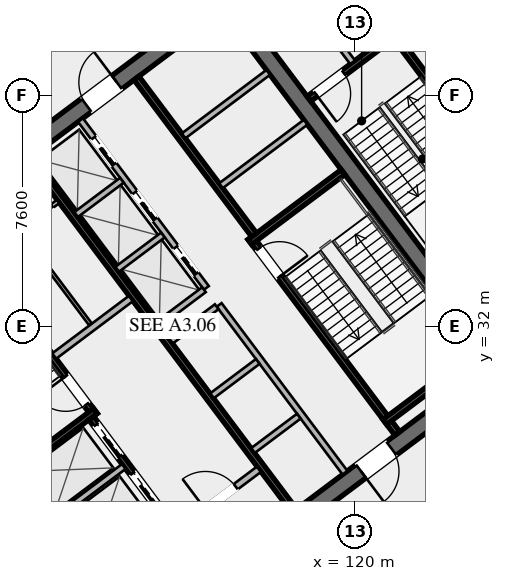
"""IFC4 building model, lengths in metres.
Left out: names, types, materials, properties, quantities, classifications, styles, units other than length and angle.
Written with IfcOpenShell. Run it as: python <this file> out.ifc"""

import sys

from ifc_helpers import new_model, si_unit, direction, frame, frame_2d, origin, place, context, subcontext, project, spatial, rectangle, extrude, element, fill, save


model = new_model("IFC4")
c1 = context("Model", 3, precision=1e-05, world=origin(), true_north=direction((0.0, 1.0)))
c2 = subcontext(c1, "Body", "Model", "MODEL_VIEW")
j1 = project(units=[si_unit("LENGTHUNIT", "METRE"), si_unit("PLANEANGLEUNIT", "RADIAN")], contexts=[c1])
p1 = place(None, origin())
s1 = spatial("IfcSite", under=j1, at=p1, CompositionType="ELEMENT")
p2 = place(p1, origin())
s2 = spatial("IfcBuilding", under=s1, at=p2, CompositionType="ELEMENT")
p3 = place(p2, frame((0.0, 0.0, 109.8)))
s3 = spatial("IfcBuildingStorey", under=s2, at=p3, CompositionType="ELEMENT", Elevation=109.8)
for number, where, z_axis, x_axis in (
    (1, (112.436, 21.077, 0.0), (0.0, 0.0, 1.0), (-0.6, 0.8, 0.0)),
    (2, (115.564, 42.923, 0.0), (0.0, 0.0, 1.0), (0.6, -0.8, 0.0)),
):
    element("IfcWall", number, at=place(p3, frame(where, z_axis=z_axis, x_axis=x_axis)), inside=s3, PredefinedType="SHEAR", context=c2, shape_type="SweptSolid", body=[
        extrude(rectangle(XDim=15.6, YDim=0.55, at=frame_2d((7.8, 0.0))), origin(), (0.0, 0.0, 1.0), 4.6),
    ])
p4 = place(p3, frame((124.539, 30.498, 0.0), z_axis=(0.0, 0.0, 1.0), x_axis=(-0.799998054672, -0.600002593761, 0.0)))
e3 = element("IfcWall", 3, at=p4, inside=s3, PredefinedType="SHEAR", context=c2, shape_type="SweptSolid", body=[
    extrude(rectangle(XDim=15.06, YDim=0.55, at=frame_2d((7.53, 0.0))), origin(), (0.0, 0.0, 1.0), 4.6),
])
p5 = place(p4, frame((9.23, 0.0, 0.0)))
e4 = element("IfcOpeningElement", 4, at=p5, cuts=e3, PredefinedType="OPENING", context=c2, shape_type="SweptSolid", body=[
    extrude(rectangle(XDim=1.25, YDim=2.25, at=frame_2d((0.625, 1.125))), frame((0.0, 0.285, 0.0), z_axis=(0.0, -1.0, 0.0), x_axis=(1.0, 0.0, 0.0)), (0.0, 0.0, 1.0), 0.57),
])
p6 = place(p4, frame((4.18, 0.0, 0.0)))
e5 = element("IfcOpeningElement", 5, at=p6, cuts=e3, PredefinedType="OPENING", context=c2, shape_type="SweptSolid", body=[
    extrude(rectangle(XDim=1.25, YDim=2.25, at=frame_2d((0.625, 1.125))), frame((0.0, 0.285, 0.0), z_axis=(0.0, -1.0, 0.0), x_axis=(1.0, 0.0, 0.0)), (0.0, 0.0, 1.0), 0.57),
])
p7 = place(p3, frame((103.461, 33.502, 0.0), z_axis=(0.0, 0.0, 1.0), x_axis=(0.799998054672, 0.600002593761, 0.0)))
e6 = element("IfcWall", 6, at=p7, inside=s3, PredefinedType="SHEAR", context=c2, shape_type="SweptSolid", body=[
    extrude(rectangle(XDim=15.06, YDim=0.55, at=frame_2d((7.53, 0.0))), origin(), (0.0, 0.0, 1.0), 4.6),
])
p8 = place(p7, frame((4.58, 0.0, 0.0)))
e7 = element("IfcOpeningElement", 7, at=p8, cuts=e6, PredefinedType="OPENING", context=c2, shape_type="SweptSolid", body=[
    extrude(rectangle(XDim=1.25, YDim=2.25, at=frame_2d((0.625, 1.125))), frame((0.0, 0.285, 0.0), z_axis=(0.0, -1.0, 0.0), x_axis=(1.0, 0.0, 0.0)), (0.0, 0.0, 1.0), 0.57),
])
p9 = place(p7, frame((9.63, 0.0, 0.0)))
e8 = element("IfcOpeningElement", 8, at=p9, cuts=e6, PredefinedType="OPENING", context=c2, shape_type="SweptSolid", body=[
    extrude(rectangle(XDim=1.25, YDim=2.25, at=frame_2d((0.625, 1.125))), frame((0.0, 0.285, 0.0), z_axis=(0.0, -1.0, 0.0), x_axis=(1.0, 0.0, 0.0)), (0.0, 0.0, 1.0), 0.57),
])
for number, where, z_axis, x_axis in (
    (9, (137.672, 26.904, 0.0), (0.0, 0.0, 1.0), (-0.8, -0.6, 0.0)),
    (10, (90.328, 37.096, 0.0), (0.0, 0.0, 1.0), (0.8, 0.6, 0.0)),
    (11, (119.096, 55.672, 0.0), (0.0, 0.0, 1.0), (0.6, -0.8, 0.0)),
):
    element("IfcWall", number, at=place(p3, frame(where, z_axis=z_axis, x_axis=x_axis)), inside=s3, PredefinedType="SOLIDWALL", context=c2, shape_type="SweptSolid", body=[
        extrude(rectangle(XDim=31.76, YDim=0.28, at=frame_2d((15.88, 0.0))), origin(), (0.0, 0.0, 1.0), 4.42),
    ])
p10 = place(p3, frame((111.44, 29.08, 0.0), z_axis=(0.0, 0.0, 1.0), x_axis=(-0.59999029481, 0.8000072788, 0.0)))
e12 = element("IfcWall", 12, at=p10, inside=s3, PredefinedType="SHEAR", context=c2, shape_type="SweptSolid", body=[
    extrude(rectangle(XDim=8.05, YDim=0.2, at=frame_2d((4.025, 0.0))), origin(), (0.0, 0.0, 1.0), 4.42),
])
p11 = place(p10, frame((0.45, 0.0, 0.0)))
e13 = element("IfcOpeningElement", 13, at=p11, cuts=e12, PredefinedType="OPENING", context=c2, shape_type="SweptSolid", body=[
    extrude(rectangle(XDim=1.15, YDim=2.2, at=frame_2d((0.575, 1.1))), frame((0.0, 0.11, 0.0), z_axis=(0.0, -1.0, 0.0), x_axis=(1.0, 0.0, 0.0)), (0.0, 0.0, 1.0), 0.22),
])
p12 = place(p3, frame((108.396, 26.922, 0.0), z_axis=(0.0, 0.0, 1.0), x_axis=(0.800015298837, 0.599979601008, 0.0)))
e14 = element("IfcWall", 14, at=p12, inside=s3, PredefinedType="SHEAR", context=c2, shape_type="SweptSolid", body=[
    extrude(rectangle(XDim=3.83, YDim=0.2, at=frame_2d((1.915, 0.0))), origin(), (0.0, 0.0, 1.0), 4.42),
])
p13 = place(p3, frame((116.56, 34.92, 0.0), z_axis=(0.0, 0.0, 1.0), x_axis=(0.59999029481, -0.8000072788, 0.0)))
e15 = element("IfcWall", 15, at=p13, inside=s3, PredefinedType="SHEAR", context=c2, shape_type="SweptSolid", body=[
    extrude(rectangle(XDim=8.05, YDim=0.2, at=frame_2d((4.025, 0.0))), origin(), (0.0, 0.0, 1.0), 4.42),
])
p14 = place(p13, frame((0.45, 0.0, 0.0)))
e16 = element("IfcOpeningElement", 16, at=p14, cuts=e15, PredefinedType="OPENING", context=c2, shape_type="SweptSolid", body=[
    extrude(rectangle(XDim=1.15, YDim=2.2, at=frame_2d((0.575, 1.1))), frame((0.0, 0.11, 0.0), z_axis=(0.0, -1.0, 0.0), x_axis=(1.0, 0.0, 0.0)), (0.0, 0.0, 1.0), 0.22),
])
for number, where, z_axis, x_axis in (
    (17, (116.54, 34.78, 0.0), (0.0, 0.0, 1.0), (0.8, 0.6, 0.0)),
    (18, (120.98, 28.86, 0.0), (0.0, 0.0, 1.0), (0.8, 0.6, 0.0)),
):
    element("IfcWall", number, at=place(p3, frame(where, z_axis=z_axis, x_axis=x_axis)), inside=s3, PredefinedType="SHEAR", context=c2, shape_type="SweptSolid", body=[
        extrude(rectangle(XDim=3.83, YDim=0.2, at=frame_2d((1.915, 0.0))), origin(), (0.0, 0.0, 1.0), 4.42),
    ])
p15 = place(p3, frame((117.998, 25.936, 0.0), z_axis=(0.0, 0.0, 1.0), x_axis=(-0.600002693989, 0.799997979501, 0.0)))
e19 = element("IfcWall", 19, at=p15, inside=s3, PredefinedType="SHEAR", context=c2, shape_type="SweptSolid", body=[
    extrude(rectangle(XDim=14.5, YDim=0.2, at=frame_2d((7.25, 0.0))), origin(), (0.0, 0.0, 1.0), 4.42),
])
p16 = place(p3, frame((110.104, 31.028, 0.0), z_axis=(0.0, 0.0, 1.0), x_axis=(0.800018601094, 0.59997519774, 0.0)))
e20 = element("IfcWall", 20, at=p16, inside=s3, PredefinedType="SOLIDWALL", context=c2, shape_type="SweptSolid", body=[
    extrude(rectangle(XDim=3.15, YDim=0.22, at=frame_2d((1.575, 0.0))), origin(), (0.0, 0.0, 1.0), 3.531),
])
p17 = place(p3, frame((114.316, 25.412, 0.0), z_axis=(0.0, 0.0, 1.0), x_axis=(0.800018601094, 0.59997519774, 0.0)))
e21 = element("IfcWall", 21, at=p17, inside=s3, PredefinedType="SOLIDWALL", context=c2, shape_type="SweptSolid", body=[
    extrude(rectangle(XDim=3.15, YDim=0.22, at=frame_2d((1.575, 0.0))), origin(), (0.0, 0.0, 1.0), 3.531),
])
p18 = place(p17, frame((0.95, 0.0, 0.0)))
e22 = element("IfcOpeningElement", 22, at=p18, cuts=e21, PredefinedType="OPENING", context=c2, shape_type="SweptSolid", body=[
    extrude(rectangle(XDim=1.25, YDim=2.25, at=frame_2d((0.625, 1.125))), frame((0.0, 0.12, 0.0), z_axis=(0.0, -1.0, 0.0), x_axis=(1.0, 0.0, 0.0)), (0.0, 0.0, 1.0), 0.24),
])
p19 = place(p3, frame((115.19, 23.83, 0.0), z_axis=(0.0, 0.0, 1.0), x_axis=(-0.599993943644, 0.800004542231, 0.0)))
e23 = element("IfcWall", 23, at=p19, inside=s3, PredefinedType="SHEAR", context=c2, shape_type="SweptSolid", body=[
    extrude(rectangle(XDim=6.45, YDim=0.2, at=frame_2d((3.225, 0.0))), origin(), (0.0, 0.0, 1.0), 4.42),
])
p20 = place(p19, frame((4.875, 0.0, 0.0)))
e24 = element("IfcOpeningElement", 24, at=p20, cuts=e23, PredefinedType="OPENING", context=c2, shape_type="SweptSolid", body=[
    extrude(rectangle(XDim=1.3, YDim=2.25, at=frame_2d((0.65, 1.125))), frame((0.0, 0.11, 0.0), z_axis=(0.0, -1.0, 0.0), x_axis=(1.0, 0.0, 0.0)), (0.0, 0.0, 1.0), 0.22),
])
p21 = place(p19, frame((2.875, 0.0, 0.0)))
e25 = element("IfcOpeningElement", 25, at=p21, cuts=e23, PredefinedType="OPENING", context=c2, shape_type="SweptSolid", body=[
    extrude(rectangle(XDim=1.3, YDim=2.25, at=frame_2d((0.65, 1.125))), frame((0.0, 0.11, 0.0), z_axis=(0.0, -1.0, 0.0), x_axis=(1.0, 0.0, 0.0)), (0.0, 0.0, 1.0), 0.22),
])
p22 = place(p19, frame((0.675, 0.0, 0.0)))
e26 = element("IfcOpeningElement", 26, at=p22, cuts=e23, PredefinedType="OPENING", context=c2, shape_type="SweptSolid", body=[
    extrude(rectangle(XDim=1.3, YDim=2.25, at=frame_2d((0.65, 1.125))), frame((0.0, 0.11, 0.0), z_axis=(0.0, -1.0, 0.0), x_axis=(1.0, 0.0, 0.0)), (0.0, 0.0, 1.0), 0.22),
])
p23 = place(p3, frame((109.608, 25.306, 0.0), z_axis=(0.0, 0.0, 1.0), x_axis=(0.8, 0.6, 0.0)))
e27 = element("IfcWall", 27, at=p23, inside=s3, PredefinedType="SOLIDWALL", context=c2, shape_type="SweptSolid", body=[
    extrude(rectangle(XDim=3.48, YDim=0.2, at=frame_2d((1.74, 0.0))), origin(), (0.0, 0.0, 1.0), 4.42),
])
p24 = place(p3, frame((112.81, 40.17, 0.0), z_axis=(0.0, 0.0, 1.0), x_axis=(0.599993943644, -0.800004542231, 0.0)))
e28 = element("IfcWall", 28, at=p24, inside=s3, PredefinedType="SHEAR", context=c2, shape_type="SweptSolid", body=[
    extrude(rectangle(XDim=6.45, YDim=0.2, at=frame_2d((3.225, 0.0))), origin(), (0.0, 0.0, 1.0), 4.42),
])
for number, where, z_axis, x_axis in (
    (29, (115.59, 36.63, 0.0), (0.0, 0.0, 1.0), (0.8, 0.6, 0.0)),
    (30, (114.36, 38.27, 0.0), (0.0, 0.0, 1.0), (0.8, 0.6, 0.0)),
):
    element("IfcWall", number, at=place(p3, frame(where, z_axis=z_axis, x_axis=x_axis)), inside=s3, PredefinedType="SOLIDWALL", context=c2, shape_type="SweptSolid", body=[
        extrude(rectangle(XDim=3.48, YDim=0.2, at=frame_2d((1.74, 0.0))), origin(), (0.0, 0.0, 1.0), 4.42),
    ])
p25 = place(p3, frame((107.71, 34.22, 0.0), z_axis=(0.0, 0.0, 1.0), x_axis=(0.799981399002, 0.60002480053, 0.0)))
e31 = element("IfcWall", 31, at=p25, inside=s3, PredefinedType="PARTITIONING", context=c2, shape_type="SweptSolid", body=[
    extrude(rectangle(XDim=3.15, YDim=0.135, at=frame_2d((1.575, 0.0))), origin(), (0.0, 0.0, 1.0), 3.531),
])
p26 = place(p25, frame((0.25, 0.0, 0.0)))
e32 = element("IfcOpeningElement", 32, at=p26, cuts=e31, PredefinedType="OPENING", context=c2, shape_type="SweptSolid", body=[
    extrude(rectangle(XDim=0.95, YDim=2.05, at=frame_2d((0.475, 1.025))), frame((0.0, 0.077, 0.0), z_axis=(0.0, -1.0, 0.0), x_axis=(1.0, 0.0, 0.0)), (0.0, 0.0, 1.0), 0.155),
])
p27 = place(p25, frame((1.95, 0.0, 0.0)))
e33 = element("IfcOpeningElement", 33, at=p27, cuts=e31, PredefinedType="OPENING", context=c2, shape_type="SweptSolid", body=[
    extrude(rectangle(XDim=0.95, YDim=2.05, at=frame_2d((0.475, 1.025))), frame((0.0, 0.077, 0.0), z_axis=(0.0, -1.0, 0.0), x_axis=(1.0, 0.0, 0.0)), (0.0, 0.0, 1.0), 0.155),
])
p28 = place(p3, frame((111.296, 32.072, 0.0), z_axis=(0.0, 0.0, 1.0), x_axis=(-0.59995887973, 0.800030838552, 0.0)))
e34 = element("IfcWall", 34, at=p28, inside=s3, PredefinedType="PARTITIONING", context=c2, shape_type="SweptSolid", body=[
    extrude(rectangle(XDim=3.8, YDim=0.11, at=frame_2d((1.9, 0.0))), origin(), (0.0, 0.0, 1.0), 3.531),
])
p29 = place(p3, frame((119.67, 27.19, 0.0), z_axis=(0.0, 0.0, 1.0), x_axis=(-0.599988677396, 0.800008491828, 0.0)))
e35 = element("IfcWall", 35, at=p29, inside=s3, PredefinedType="SOLIDWALL", context=c2, shape_type="SweptSolid", body=[
    extrude(rectangle(XDim=6.9, YDim=0.2, at=frame_2d((3.45, 0.0))), origin(), (0.0, 0.0, 1.0), 4.42),
])
p30 = place(p3, frame((116.646, 27.922, 0.0), z_axis=(0.0, 0.0, 1.0), x_axis=(0.8, 0.6, 0.0)))
e36 = element("IfcWall", 36, at=p30, inside=s3, PredefinedType="SOLIDWALL", context=c2, shape_type="SweptSolid", body=[
    extrude(rectangle(XDim=1.88, YDim=0.2, at=frame_2d((0.94, 0.0))), origin(), (0.0, 0.0, 1.0), 4.42),
])
p31 = place(p3, frame((115.296, 29.722, 0.0), z_axis=(0.0, 0.0, 1.0), x_axis=(0.799984418148, 0.600020775241, 0.0)))
e37 = element("IfcWall", 37, at=p31, inside=s3, PredefinedType="SOLIDWALL", context=c2, shape_type="SweptSolid", body=[
    extrude(rectangle(XDim=1.88, YDim=0.2, at=frame_2d((0.94, 0.0))), origin(), (0.0, 0.0, 1.0), 4.42),
])
p32 = place(p3, frame((113.946, 31.522, 0.0), z_axis=(0.0, 0.0, 1.0), x_axis=(0.8, 0.6, 0.0)))
e38 = element("IfcWall", 38, at=p32, inside=s3, PredefinedType="SOLIDWALL", context=c2, shape_type="SweptSolid", body=[
    extrude(rectangle(XDim=1.88, YDim=0.2, at=frame_2d((0.94, 0.0))), origin(), (0.0, 0.0, 1.0), 4.42),
])
p33 = place(p3, frame((115.11, 33.27, 0.0), z_axis=(0.0, 0.0, 1.0), x_axis=(-0.600011322243, 0.799991508192, 0.0)))
e39 = element("IfcWall", 39, at=p33, inside=s3, PredefinedType="SOLIDWALL", context=c2, shape_type="SweptSolid", body=[
    extrude(rectangle(XDim=6.9, YDim=0.2, at=frame_2d((3.45, 0.0))), origin(), (0.0, 0.0, 1.0), 4.42),
])
p34 = place(p33, frame((0.575, 0.0, 0.0)))
e40 = element("IfcOpeningElement", 40, at=p34, cuts=e39, PredefinedType="OPENING", context=c2, shape_type="SweptSolid", body=[
    extrude(rectangle(XDim=1.1, YDim=2.2, at=frame_2d((0.55, 1.1))), frame((0.0, 0.11, 0.0), z_axis=(0.0, -1.0, 0.0), x_axis=(1.0, 0.0, 0.0)), (0.0, 0.0, 1.0), 0.22),
])
p35 = place(p33, frame((2.825, 0.0, 0.0)))
e41 = element("IfcOpeningElement", 41, at=p35, cuts=e39, PredefinedType="OPENING", context=c2, shape_type="SweptSolid", body=[
    extrude(rectangle(XDim=1.1, YDim=2.2, at=frame_2d((0.55, 1.1))), frame((0.0, 0.11, 0.0), z_axis=(0.0, -1.0, 0.0), x_axis=(1.0, 0.0, 0.0)), (0.0, 0.0, 1.0), 0.22),
])
p36 = place(p33, frame((5.075, 0.0, 0.0)))
e42 = element("IfcOpeningElement", 42, at=p36, cuts=e39, PredefinedType="OPENING", context=c2, shape_type="SweptSolid", body=[
    extrude(rectangle(XDim=1.1, YDim=2.2, at=frame_2d((0.55, 1.1))), frame((0.0, 0.11, 0.0), z_axis=(0.0, -1.0, 0.0), x_axis=(1.0, 0.0, 0.0)), (0.0, 0.0, 1.0), 0.22),
])
p37 = place(p3, frame((113.526, 32.082, 0.0), z_axis=(0.0, 0.0, 1.0), x_axis=(0.800046745961, 0.599937666993, 0.0)))
e43 = element("IfcWall", 43, at=p37, inside=s3, PredefinedType="SOLIDWALL", context=c2, shape_type="SweptSolid", body=[
    extrude(rectangle(XDim=1.88, YDim=0.2, at=frame_2d((0.94, 0.0))), origin(), (0.0, 0.0, 1.0), 4.42),
])
p38 = place(p3, frame((112.176, 33.882, 0.0), z_axis=(0.0, 0.0, 1.0), x_axis=(0.8, 0.6, 0.0)))
e44 = element("IfcWall", 44, at=p38, inside=s3, PredefinedType="SOLIDWALL", context=c2, shape_type="SweptSolid", body=[
    extrude(rectangle(XDim=1.88, YDim=0.2, at=frame_2d((0.94, 0.0))), origin(), (0.0, 0.0, 1.0), 4.42),
])
p39 = place(p3, frame((110.826, 35.682, 0.0), z_axis=(0.0, 0.0, 1.0), x_axis=(0.799984418148, 0.600020775241, 0.0)))
e45 = element("IfcWall", 45, at=p39, inside=s3, PredefinedType="SOLIDWALL", context=c2, shape_type="SweptSolid", body=[
    extrude(rectangle(XDim=1.88, YDim=0.2, at=frame_2d((0.94, 0.0))), origin(), (0.0, 0.0, 1.0), 4.42),
])
p40 = place(p3, frame((125.304, 36.228, 0.0), z_axis=(0.0, 0.0, 1.0), x_axis=(-0.59998851072, 0.800008616831, 0.0)))
e46 = element("IfcWall", 46, at=p40, inside=s3, PredefinedType="SHEAR", context=c2, shape_type="SweptSolid", body=[
    extrude(rectangle(XDim=6.8, YDim=0.2, at=frame_2d((3.4, 0.0))), origin(), (0.0, 0.0, 1.0), 4.42),
])
p41 = place(p3, frame((121.204, 41.528, 0.0), z_axis=(0.0, 0.0, 1.0), x_axis=(-0.800017232136, -0.599977023131, 0.0)))
e47 = element("IfcWall", 47, at=p41, inside=s3, PredefinedType="SHEAR", context=c2, shape_type="SweptSolid", body=[
    extrude(rectangle(XDim=3.4, YDim=0.2, at=frame_2d((1.7, 0.0))), origin(), (0.0, 0.0, 1.0), 4.42),
])
p42 = place(p41, frame((1.975, 0.0, 0.0)))
e48 = element("IfcOpeningElement", 48, at=p42, cuts=e47, PredefinedType="OPENING", context=c2, shape_type="SweptSolid", body=[
    extrude(rectangle(XDim=1.15, YDim=2.2, at=frame_2d((0.575, 1.1))), frame((0.0, 0.11, 0.0), z_axis=(0.0, -1.0, 0.0), x_axis=(1.0, 0.0, 0.0)), (0.0, 0.0, 1.0), 0.22),
])
p43 = place(p3, frame((100.07, 33.99, 0.0), z_axis=(0.0, 0.0, 1.0), x_axis=(0.8, 0.6, 0.0)))
e49 = element("IfcWall", 49, at=p43, inside=s3, PredefinedType="SOLIDWALL", context=c2, shape_type="SweptSolid", body=[
    extrude(rectangle(XDim=19.9, YDim=0.2, at=frame_2d((9.95, 0.0))), origin(), (0.0, 0.0, 1.0), 3.531),
])
p44 = place(p43, frame((2.2, 0.0, 0.0)))
e50 = element("IfcOpeningElement", 50, at=p44, cuts=e49, PredefinedType="OPENING", context=c2, shape_type="SweptSolid", body=[
    extrude(rectangle(XDim=1.15, YDim=2.2, at=frame_2d((0.575, 1.1))), frame((0.0, 0.11, 0.0), z_axis=(0.0, -1.0, 0.0), x_axis=(1.0, 0.0, 0.0)), (0.0, 0.0, 1.0), 0.22),
])
p45 = place(p3, frame((127.93, 30.01, 0.0), z_axis=(0.0, 0.0, 1.0), x_axis=(-0.8, -0.6, 0.0)))
e51 = element("IfcWall", 51, at=p45, inside=s3, PredefinedType="SOLIDWALL", context=c2, shape_type="SweptSolid", body=[
    extrude(rectangle(XDim=19.9, YDim=0.2, at=frame_2d((9.95, 0.0))), origin(), (0.0, 0.0, 1.0), 3.531),
])
p46 = place(p45, frame((2.2, 0.0, 0.0)))
e52 = element("IfcOpeningElement", 52, at=p46, cuts=e51, PredefinedType="OPENING", context=c2, shape_type="SweptSolid", body=[
    extrude(rectangle(XDim=1.15, YDim=2.2, at=frame_2d((0.575, 1.1))), frame((0.0, 0.11, 0.0), z_axis=(0.0, -1.0, 0.0), x_axis=(1.0, 0.0, 0.0)), (0.0, 0.0, 1.0), 0.22),
])
p47 = place(p3, frame((116.062, 45.834, 0.0), z_axis=(0.0, 0.0, 1.0), x_axis=(0.599987849816, -0.800009112494, 0.0)))
e53 = element("IfcWall", 53, at=p47, inside=s3, PredefinedType="SOLIDWALL", context=c2, shape_type="SweptSolid", body=[
    extrude(rectangle(XDim=6.43, YDim=0.2, at=frame_2d((3.215, 0.0))), origin(), (0.0, 0.0, 1.0), 3.531),
])
p48 = place(p47, frame((3.0, 0.0, 0.0)))
e54 = element("IfcOpeningElement", 54, at=p48, cuts=e53, PredefinedType="OPENING", context=c2, shape_type="SweptSolid", body=[
    extrude(rectangle(XDim=1.25, YDim=2.25, at=frame_2d((0.625, 1.125))), frame((0.0, 0.11, 0.0), z_axis=(0.0, -1.0, 0.0), x_axis=(1.0, 0.0, 0.0)), (0.0, 0.0, 1.0), 0.22),
])
p49 = place(p3, frame((111.938, 18.166, 0.0), z_axis=(0.0, 0.0, 1.0), x_axis=(-0.59999602618, 0.80000298035, 0.0)))
e55 = element("IfcWall", 55, at=p49, inside=s3, PredefinedType="SOLIDWALL", context=c2, shape_type="SweptSolid", body=[
    extrude(rectangle(XDim=19.66, YDim=0.2, at=frame_2d((9.83, 0.0))), origin(), (0.0, 0.0, 1.0), 3.531),
])
p50 = place(p49, frame((3.0, 0.0, 0.0)))
e56 = element("IfcOpeningElement", 56, at=p50, cuts=e55, PredefinedType="OPENING", context=c2, shape_type="SweptSolid", body=[
    extrude(rectangle(XDim=1.25, YDim=2.25, at=frame_2d((0.625, 1.125))), frame((0.0, 0.11, 0.0), z_axis=(0.0, -1.0, 0.0), x_axis=(1.0, 0.0, 0.0)), (0.0, 0.0, 1.0), 0.22),
])
p51 = place(p49, frame((13.2, 0.0, 0.0)))
e57 = element("IfcOpeningElement", 57, at=p51, cuts=e55, PredefinedType="OPENING", context=c2, shape_type="SweptSolid", body=[
    extrude(rectangle(XDim=1.15, YDim=2.2, at=frame_2d((0.575, 1.1))), frame((0.0, 0.11, 0.0), z_axis=(0.0, -1.0, 0.0), x_axis=(1.0, 0.0, 0.0)), (0.0, 0.0, 1.0), 0.22),
])
p52 = place(p9, origin())
e58 = element("IfcDoor", 58, at=p52, inside=s3, OperationType="SINGLE_SWING_RIGHT", PredefinedType="DOOR", context=c2, shape_type="SweptSolid", body=[
    extrude(rectangle(XDim=1.25, YDim=2.25, at=frame_2d((0.625, 1.125))), frame((0.0, 0.025, 0.0), z_axis=(0.0, -1.0, 0.0), x_axis=(1.0, 0.0, 0.0)), (0.0, 0.0, 1.0), 0.05),
])
fill(e8, e58)
p53 = place(p6, origin())
e59 = element("IfcDoor", 59, at=p53, inside=s3, OperationType="SINGLE_SWING_RIGHT", PredefinedType="DOOR", context=c2, shape_type="SweptSolid", body=[
    extrude(rectangle(XDim=1.25, YDim=2.25, at=frame_2d((0.625, 1.125))), frame((0.0, 0.025, 0.0), z_axis=(0.0, -1.0, 0.0), x_axis=(1.0, 0.0, 0.0)), (0.0, 0.0, 1.0), 0.05),
])
fill(e5, e59)
p54 = place(p11, origin())
e60 = element("IfcDoor", 60, at=p54, inside=s3, OperationType="SINGLE_SWING_RIGHT", PredefinedType="DOOR", context=c2, shape_type="SweptSolid", body=[
    extrude(rectangle(XDim=1.15, YDim=2.2, at=frame_2d((0.575, 1.1))), frame((0.0, 0.025, 0.0), z_axis=(0.0, -1.0, 0.0), x_axis=(1.0, 0.0, 0.0)), (0.0, 0.0, 1.0), 0.05),
])
fill(e13, e60)
p55 = place(p14, origin())
e61 = element("IfcDoor", 61, at=p55, inside=s3, OperationType="SINGLE_SWING_RIGHT", PredefinedType="DOOR", context=c2, shape_type="SweptSolid", body=[
    extrude(rectangle(XDim=1.15, YDim=2.2, at=frame_2d((0.575, 1.1))), frame((0.0, 0.025, 0.0), z_axis=(0.0, -1.0, 0.0), x_axis=(1.0, 0.0, 0.0)), (0.0, 0.0, 1.0), 0.05),
])
fill(e16, e61)
p56 = place(p18, origin())
e62 = element("IfcDoor", 62, at=p56, inside=s3, OperationType="SINGLE_SWING_LEFT", PredefinedType="DOOR", context=c2, shape_type="SweptSolid", body=[
    extrude(rectangle(XDim=1.25, YDim=2.25, at=frame_2d((0.625, 1.125))), frame((0.0, 0.025, 0.0), z_axis=(0.0, -1.0, 0.0), x_axis=(1.0, 0.0, 0.0)), (0.0, 0.0, 1.0), 0.05),
])
fill(e22, e62)
p57 = place(p42, origin())
e63 = element("IfcDoor", 63, at=p57, inside=s3, OperationType="SINGLE_SWING_RIGHT", PredefinedType="DOOR", context=c2, shape_type="SweptSolid", body=[
    extrude(rectangle(XDim=1.15, YDim=2.2, at=frame_2d((0.575, 1.1))), frame((0.0, 0.025, 0.0), z_axis=(0.0, -1.0, 0.0), x_axis=(1.0, 0.0, 0.0)), (0.0, 0.0, 1.0), 0.05),
])
fill(e48, e63)
p58 = place(p20, origin())
e64 = element("IfcDoor", 64, at=p58, inside=s3, OperationType="SLIDING_TO_LEFT", PredefinedType="DOOR", context=c2, shape_type="SweptSolid", body=[
    extrude(rectangle(XDim=1.3, YDim=2.25, at=frame_2d((0.65, 1.125))), frame((0.0, 0.025, 0.0), z_axis=(0.0, -1.0, 0.0), x_axis=(1.0, 0.0, 0.0)), (0.0, 0.0, 1.0), 0.05),
])
fill(e24, e64)
p59 = place(p21, origin())
e65 = element("IfcDoor", 65, at=p59, inside=s3, OperationType="SLIDING_TO_LEFT", PredefinedType="DOOR", context=c2, shape_type="SweptSolid", body=[
    extrude(rectangle(XDim=1.3, YDim=2.25, at=frame_2d((0.65, 1.125))), frame((0.0, 0.025, 0.0), z_axis=(0.0, -1.0, 0.0), x_axis=(1.0, 0.0, 0.0)), (0.0, 0.0, 1.0), 0.05),
])
fill(e25, e65)
p60 = place(p34, origin())
e66 = element("IfcDoor", 66, at=p60, inside=s3, OperationType="SLIDING_TO_LEFT", PredefinedType="DOOR", context=c2, shape_type="SweptSolid", body=[
    extrude(rectangle(XDim=1.1, YDim=2.2, at=frame_2d((0.55, 1.1))), frame((0.0, 0.025, 0.0), z_axis=(0.0, -1.0, 0.0), x_axis=(1.0, 0.0, 0.0)), (0.0, 0.0, 1.0), 0.05),
])
fill(e40, e66)
p61 = place(p35, origin())
e67 = element("IfcDoor", 67, at=p61, inside=s3, OperationType="SLIDING_TO_LEFT", PredefinedType="DOOR", context=c2, shape_type="SweptSolid", body=[
    extrude(rectangle(XDim=1.1, YDim=2.2, at=frame_2d((0.55, 1.1))), frame((0.0, 0.025, 0.0), z_axis=(0.0, -1.0, 0.0), x_axis=(1.0, 0.0, 0.0)), (0.0, 0.0, 1.0), 0.05),
])
fill(e41, e67)
p62 = place(p36, origin())
e68 = element("IfcDoor", 68, at=p62, inside=s3, OperationType="SLIDING_TO_LEFT", PredefinedType="DOOR", context=c2, shape_type="SweptSolid", body=[
    extrude(rectangle(XDim=1.1, YDim=2.2, at=frame_2d((0.55, 1.1))), frame((0.0, 0.025, 0.0), z_axis=(0.0, -1.0, 0.0), x_axis=(1.0, 0.0, 0.0)), (0.0, 0.0, 1.0), 0.05),
])
fill(e42, e68)
save(model, sys.argv[1])
